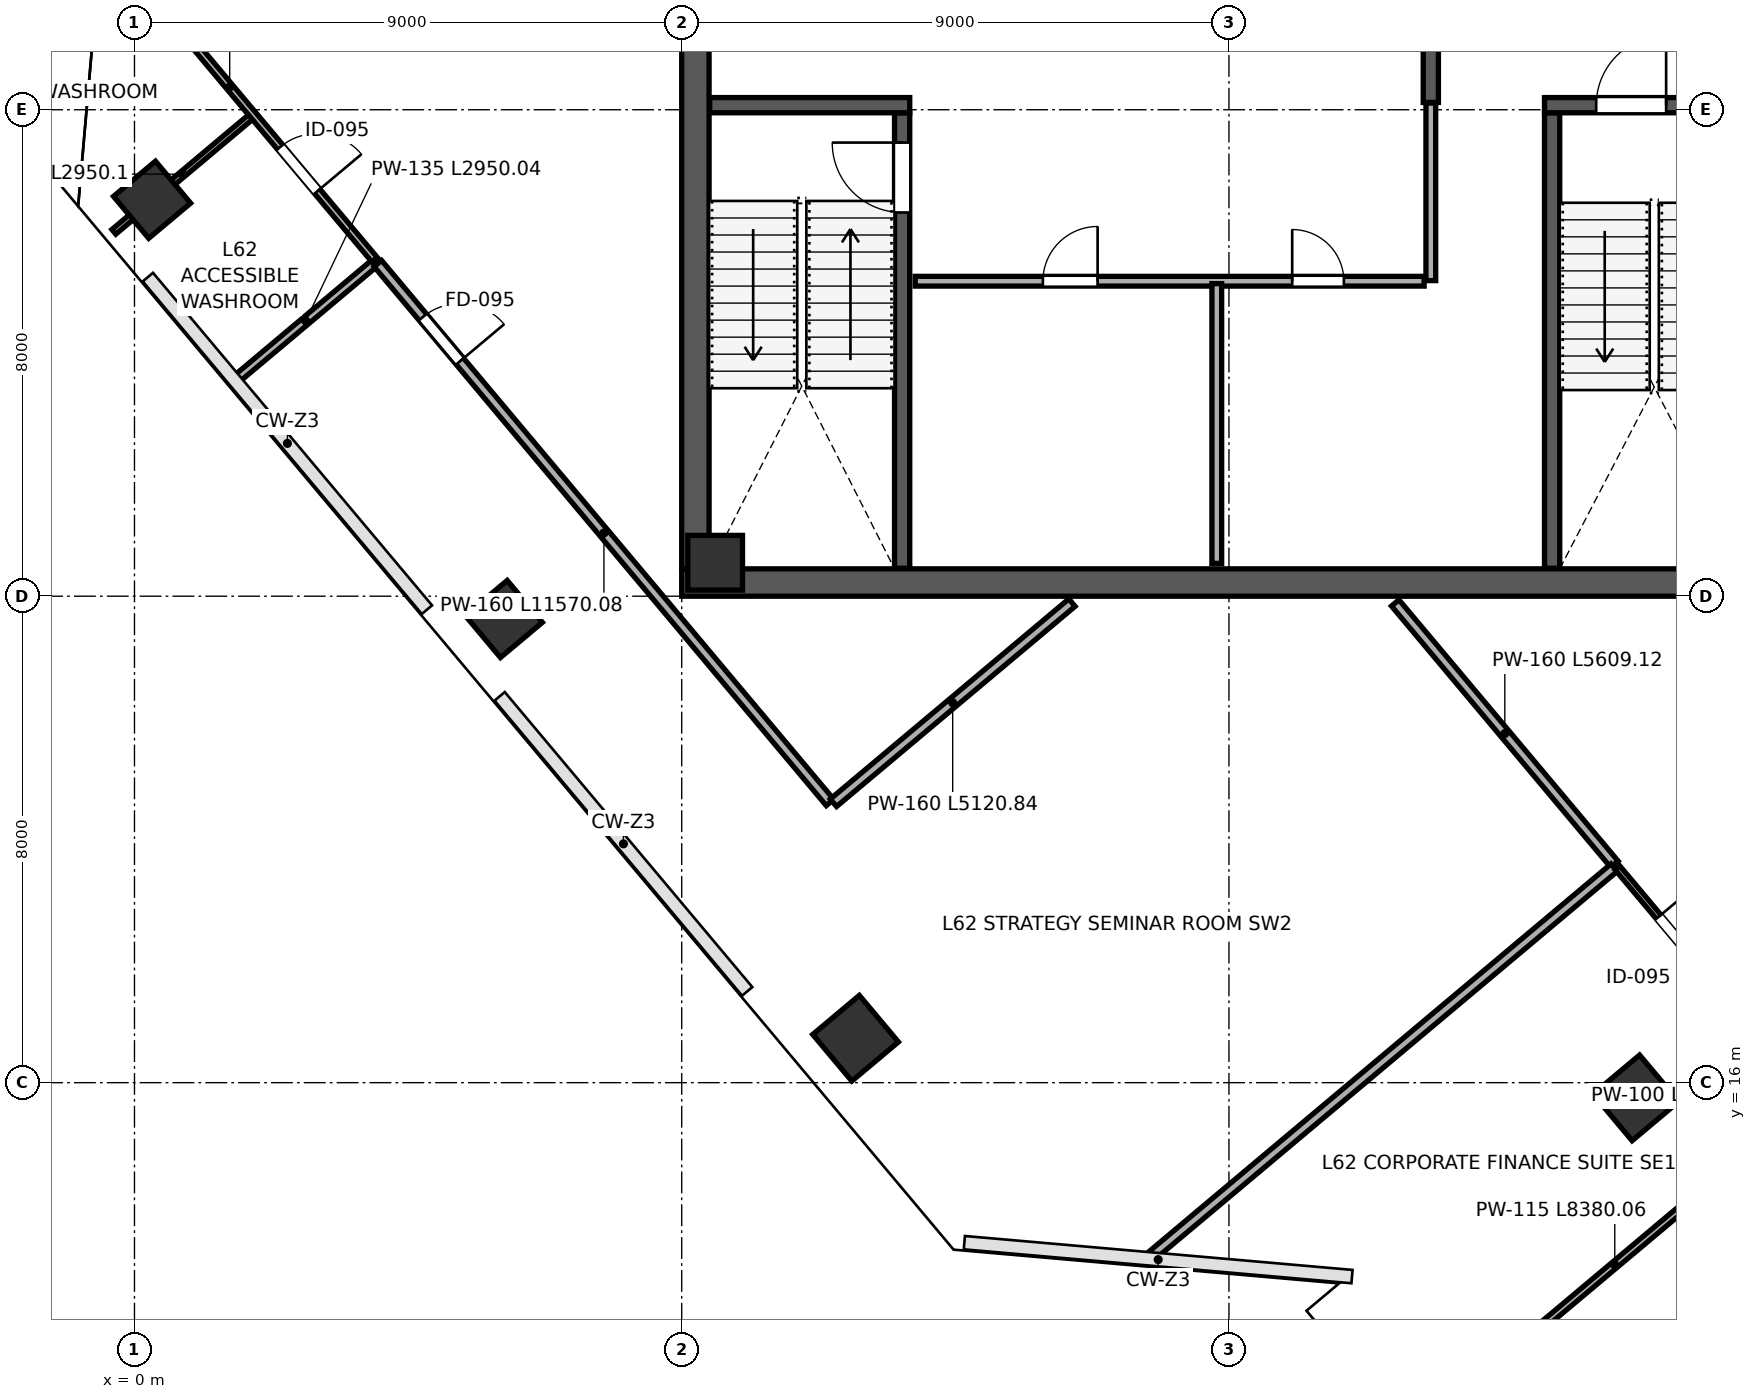
"""IFC4 building model, lengths in metres.
Left out: names, types, materials, properties, quantities, classifications, styles, units other than length and angle.
Written with IfcOpenShell. Run it as: python <this file> out.ifc"""

import sys

from ifc_helpers import new_model, si_unit, direction, frame, frame_2d, origin, origin_2d, place, context, subcontext, project, spatial, rectangle, extrude, clip, halfspace, source, transform, mapped, element, fill, save


model = new_model("IFC4")
c1 = context("Model", 3, precision=1e-05, world=origin(), true_north=direction((0.0, 1.0)))
c2 = subcontext(c1, "Body", "Model", "MODEL_VIEW")
j1 = project(units=[si_unit("LENGTHUNIT", "METRE"), si_unit("PLANEANGLEUNIT", "RADIAN")], contexts=[c1])
p1 = place(None, origin())
s1 = spatial("IfcSite", under=j1, at=p1, CompositionType="ELEMENT")
p2 = place(p1, origin())
s2 = spatial("IfcBuilding", under=s1, at=p2, CompositionType="ELEMENT")
p3 = place(p2, frame((0.0, 0.0, 275.2)))
s3 = spatial("IfcBuildingStorey", under=s2, at=p3, CompositionType="ELEMENT", Elevation=275.2)
m1 = source(origin(), c2, "Body", "SweptSolid", [
    extrude(rectangle(XDim=0.9, YDim=0.9, at=origin_2d()), origin(), (0.0, 0.0, 1.0), 4.198),
])
p4 = place(p3, frame((9.55, 24.55, 0.001), z_axis=(0.0, 0.0, 1.0), x_axis=(1.0, 0.0, 0.0)))
e1 = element("IfcColumn", 1, at=p4, inside=s3, PredefinedType="COLUMN", context=c2, shape_type="MappedRepresentation", body=[
    mapped(m1, transform((0.0, 0.0, 0.0), scale=1.0)),
])
p5 = place(p3, frame((0.289, 30.52, 0.0), z_axis=(-0.010330476679, 0.215464227867, 0.976457089565), x_axis=(0.677872400292, -0.716368043102, 0.165244775241)))
e2 = element("IfcColumn", 2, at=p5, inside=s3, PredefinedType="COLUMN", context=c2, shape_type="Clipping", body=[
    clip(clip(extrude(rectangle(XDim=0.9, YDim=0.9, at=origin_2d()), origin(), (0.0, 0.0, 1.0), 4.301), halfspace(frame((0.0, 0.0, 0.141), z_axis=(0.0, 0.0, -1.0), x_axis=(1.0, 0.0, 0.0)), False)), halfspace(frame((0.0, 0.0, 4.16), z_axis=(0.0, 0.0, 1.0), x_axis=(1.0, 0.0, 0.0)), False)),
])
p6 = place(p3, frame((6.074, 23.625, 0.0), z_axis=(-0.082120416848, 0.159437132432, 0.9837865815), x_axis=(0.916523206917, -0.375646939896, 0.137384816228)))
e3 = element("IfcColumn", 3, at=p6, inside=s3, PredefinedType="COLUMN", context=c2, shape_type="Clipping", body=[
    clip(clip(extrude(rectangle(XDim=0.9, YDim=0.9, at=origin_2d()), origin(), (0.0, 0.0, 1.0), 4.269), halfspace(frame((0.0, 0.0, 0.116), z_axis=(0.0, 0.0, -1.0), x_axis=(1.0, 0.0, 0.0)), False)), halfspace(frame((0.0, 0.0, 4.153), z_axis=(0.0, 0.0, 1.0), x_axis=(1.0, 0.0, 0.0)), False)),
])
p7 = place(p3, frame((11.859, 16.731, 0.0), z_axis=(-0.153742871697, 0.101866793101, 0.982846013303), x_axis=(0.982671946425, 0.119982410812, 0.141280100526)))
e4 = element("IfcColumn", 4, at=p7, inside=s3, PredefinedType="COLUMN", context=c2, shape_type="Clipping", body=[
    clip(clip(extrude(rectangle(XDim=1.0, YDim=1.0, at=origin_2d()), origin(), (0.0, 0.0, 1.0), 4.273), halfspace(frame((0.0, 0.0, 0.133), z_axis=(0.0, 0.0, -1.0), x_axis=(1.0, 0.0, 0.0)), False)), halfspace(frame((0.0, 0.0, 4.14), z_axis=(0.0, 0.0, 1.0), x_axis=(1.0, 0.0, 0.0)), False)),
])
p8 = place(p3, frame((24.692, 15.75, 0.0), z_axis=(-0.167050942703, -0.029044865552, 0.985520359164), x_axis=(0.633685100882, 0.76260882658, 0.129888300253)))
e5 = element("IfcColumn", 5, at=p8, inside=s3, PredefinedType="COLUMN", context=c2, shape_type="Clipping", body=[
    clip(clip(extrude(rectangle(XDim=1.0, YDim=1.0, at=origin_2d()), origin(), (0.0, 0.0, 1.0), 4.262), halfspace(frame((0.0, 0.0, 0.122), z_axis=(0.0, 0.0, -1.0), x_axis=(1.0, 0.0, 0.0)), False)), halfspace(frame((0.0, 0.0, 4.14), z_axis=(0.0, 0.0, 1.0), x_axis=(1.0, 0.0, 0.0)), False)),
])
p9 = place(p3, frame((9.225, 24.45, 0.0), z_axis=(0.0, 0.0, 1.0), x_axis=(0.0, 1.0, 0.0)))
e6 = element("IfcWall", 6, at=p9, inside=s3, PredefinedType="SHEAR", context=c2, shape_type="SweptSolid", body=[
    extrude(rectangle(XDim=15.1, YDim=0.45, at=frame_2d((7.55, 0.0))), origin(), (0.0, 0.0, 1.0), 3.96),
])
p10 = place(p9, frame((8.7, 0.0, 0.0)))
e7 = element("IfcOpeningElement", 7, at=p10, cuts=e6, PredefinedType="OPENING", context=c2, shape_type="SweptSolid", body=[
    extrude(rectangle(XDim=1.15, YDim=2.2, at=frame_2d((0.575, 1.1))), frame((0.0, 0.235, 0.0), z_axis=(0.0, -1.0, 0.0), x_axis=(1.0, 0.0, 0.0)), (0.0, 0.0, 1.0), 0.47),
])
p11 = place(p3, frame((9.0, 24.225, 0.0), z_axis=(0.0, 0.0, 1.0), x_axis=(1.0, 0.0, 0.0)))
e8 = element("IfcWall", 8, at=p11, inside=s3, PredefinedType="SHEAR", context=c2, shape_type="SweptSolid", body=[
    extrude(rectangle(XDim=18.0, YDim=0.45, at=frame_2d((9.0, 0.0))), origin(), (0.0, 0.0, 1.0), 3.96),
])
p12 = place(p3, frame((12.625, 24.46, 0.0), z_axis=(0.0, 0.0, 1.0), x_axis=(0.0, 1.0, 0.0)))
e9 = element("IfcWall", 9, at=p12, inside=s3, PredefinedType="SHEAR", context=c2, shape_type="SweptSolid", body=[
    extrude(rectangle(XDim=7.49, YDim=0.25, at=frame_2d((3.745, 0.0))), origin(), (0.0, 0.0, 1.0), 3.96),
])
p13 = place(p12, frame((5.85, 0.0, 0.0)))
e10 = element("IfcOpeningElement", 10, at=p13, cuts=e9, PredefinedType="OPENING", context=c2, shape_type="SweptSolid", body=[
    extrude(rectangle(XDim=1.15, YDim=2.2, at=frame_2d((0.575, 1.1))), frame((0.0, 0.135, 0.0), z_axis=(0.0, -1.0, 0.0), x_axis=(1.0, 0.0, 0.0)), (0.0, 0.0, 1.0), 0.27),
])
p14 = place(p3, frame((9.46, 32.075, 0.0), z_axis=(0.0, 0.0, 1.0), x_axis=(1.0, 0.0, 0.0)))
e11 = element("IfcWall", 11, at=p14, inside=s3, PredefinedType="SHEAR", context=c2, shape_type="SweptSolid", body=[
    extrude(rectangle(XDim=3.29, YDim=0.25, at=frame_2d((1.645, 0.0))), origin(), (0.0, 0.0, 1.0), 3.96),
])
p15 = place(p3, frame((23.315, 24.46, 0.0), z_axis=(0.0, 0.0, 1.0), x_axis=(0.0, 1.0, 0.0)))
e12 = element("IfcWall", 12, at=p15, inside=s3, PredefinedType="SHEAR", context=c2, shape_type="SweptSolid", body=[
    extrude(rectangle(XDim=7.49, YDim=0.25, at=frame_2d((3.745, 0.0))), origin(), (0.0, 0.0, 1.0), 3.96),
])
p16 = place(p3, frame((23.19, 32.075, 0.0), z_axis=(0.0, 0.0, 1.0), x_axis=(1.0, 0.0, 0.0)))
e13 = element("IfcWall", 13, at=p16, inside=s3, PredefinedType="SHEAR", context=c2, shape_type="SweptSolid", body=[
    extrude(rectangle(XDim=3.35, YDim=0.25, at=frame_2d((1.675, 0.0))), origin(), (0.0, 0.0, 1.0), 3.96),
])
p17 = place(p16, frame((0.85, 0.0, 0.0)))
e14 = element("IfcOpeningElement", 14, at=p17, cuts=e13, PredefinedType="OPENING", context=c2, shape_type="SweptSolid", body=[
    extrude(rectangle(XDim=1.15, YDim=2.2, at=frame_2d((0.575, 1.1))), frame((0.0, 0.135, 0.0), z_axis=(0.0, -1.0, 0.0), x_axis=(1.0, 0.0, 0.0)), (0.0, 0.0, 1.0), 0.27),
])
p18 = place(p3, frame((21.32, 32.12, 0.0), z_axis=(0.0, 0.0, 1.0), x_axis=(0.0, 1.0, 0.0)))
e15 = element("IfcWall", 15, at=p18, inside=s3, PredefinedType="SHEAR", context=c2, shape_type="SweptSolid", body=[
    extrude(rectangle(XDim=7.42, YDim=0.25, at=frame_2d((3.71, 0.0))), origin(), (0.0, 0.0, 1.0), 3.96),
])
p19 = place(p18, frame((1.4, 0.0, 0.0)))
e16 = element("IfcOpeningElement", 16, at=p19, cuts=e15, PredefinedType="OPENING", context=c2, shape_type="SweptSolid", body=[
    extrude(rectangle(XDim=1.15, YDim=2.2, at=frame_2d((0.575, 1.1))), frame((0.0, 0.135, 0.0), z_axis=(0.0, -1.0, 0.0), x_axis=(1.0, 0.0, 0.0)), (0.0, 0.0, 1.0), 0.27),
])
p20 = place(p3, frame((12.84, 29.18, 0.0), z_axis=(0.0, 0.0, 1.0), x_axis=(1.0, 0.0, 0.0)))
e17 = element("IfcWall", 17, at=p20, inside=s3, PredefinedType="PARTITIONING", context=c2, shape_type="SweptSolid", body=[
    extrude(rectangle(XDim=8.37, YDim=0.16, at=frame_2d((4.185, 0.0))), origin(), (0.0, 0.0, 1.0), 3.96),
])
p21 = place(p20, frame((2.1, 0.0, 0.0)))
e18 = element("IfcOpeningElement", 18, at=p21, cuts=e17, PredefinedType="OPENING", context=c2, shape_type="SweptSolid", body=[
    extrude(rectangle(XDim=0.9, YDim=2.15, at=frame_2d((0.45, 1.075))), frame((0.0, 0.09, 0.0), z_axis=(0.0, -1.0, 0.0), x_axis=(1.0, 0.0, 0.0)), (0.0, 0.0, 1.0), 0.18),
])
p22 = place(p20, frame((6.2, 0.0, 0.0)))
e19 = element("IfcOpeningElement", 19, at=p22, cuts=e17, PredefinedType="OPENING", context=c2, shape_type="SweptSolid", body=[
    extrude(rectangle(XDim=0.85, YDim=2.1, at=frame_2d((0.425, 1.05))), frame((0.0, 0.09, 0.0), z_axis=(0.0, -1.0, 0.0), x_axis=(1.0, 0.0, 0.0)), (0.0, 0.0, 1.0), 0.18),
])
p23 = place(p3, frame((17.8, 24.54, 0.0), z_axis=(0.0, 0.0, 1.0), x_axis=(0.0, 1.0, 0.0)))
e20 = element("IfcWall", 20, at=p23, inside=s3, PredefinedType="PARTITIONING", context=c2, shape_type="SweptSolid", body=[
    extrude(rectangle(XDim=4.6, YDim=0.16, at=frame_2d((2.3, 0.0))), origin(), (0.0, 0.0, 1.0), 3.96),
])
p24 = place(p3, frame((21.32, 29.19, 0.0), z_axis=(0.0, 0.0, 1.0), x_axis=(0.0, 1.0, 0.0)))
e21 = element("IfcWall", 21, at=p24, inside=s3, PredefinedType="PARTITIONING", context=c2, shape_type="SweptSolid", body=[
    extrude(rectangle(XDim=2.92, YDim=0.16, at=frame_2d((1.46, 0.0))), origin(), (0.0, 0.0, 1.0), 3.96),
])
p25 = place(p3, frame((-0.339, 29.992, 0.0), z_axis=(0.0, 0.0, 1.0), x_axis=(0.766025914603, 0.642809690465, 0.0)))
e22 = element("IfcWall", 22, at=p25, inside=s3, PredefinedType="PARTITIONING", context=c2, shape_type="SweptSolid", body=[
    extrude(rectangle(XDim=2.95, YDim=0.1, at=frame_2d((1.475, 0.0))), origin(), (0.0, 0.0, 1.0), 3.195),
])
p26 = place(p3, frame((1.686, 27.58, 0.0), z_axis=(0.0, 0.0, 1.0), x_axis=(0.766107411761, 0.642712559116, 0.0)))
e23 = element("IfcWall", 23, at=p26, inside=s3, PredefinedType="PARTITIONING", context=c2, shape_type="SweptSolid", body=[
    extrude(rectangle(XDim=2.95, YDim=0.135, at=frame_2d((1.475, 0.0))), origin(), (0.0, 0.0, 1.0), 3.195),
])
p27 = place(p3, frame((-0.819, 35.216, 0.0), z_axis=(0.0, 0.0, 1.0), x_axis=(0.642772999209, -0.766056702528, 0.0)))
e24 = element("IfcWall", 24, at=p27, inside=s3, PredefinedType="PARTITIONING", context=c2, shape_type="SweptSolid", body=[
    extrude(rectangle(XDim=7.42, YDim=0.115, at=frame_2d((3.71, 0.0))), origin(), (0.0, 0.0, 1.0), 3.96),
])
p28 = place(p27, frame((1.7, 0.0, 0.0)))
e25 = element("IfcOpeningElement", 25, at=p28, cuts=e24, PredefinedType="OPENING", context=c2, shape_type="SweptSolid", body=[
    extrude(rectangle(XDim=0.9, YDim=2.15, at=frame_2d((0.45, 1.075))), frame((0.0, 0.067, 0.0), z_axis=(0.0, -1.0, 0.0), x_axis=(1.0, 0.0, 0.0)), (0.0, 0.0, 1.0), 0.135),
])
p29 = place(p27, frame((5.0, 0.0, 0.0)))
e26 = element("IfcOpeningElement", 26, at=p29, cuts=e24, PredefinedType="OPENING", context=c2, shape_type="SweptSolid", body=[
    extrude(rectangle(XDim=0.95, YDim=2.15, at=frame_2d((0.475, 1.075))), frame((0.0, 0.067, 0.0), z_axis=(0.0, -1.0, 0.0), x_axis=(1.0, 0.0, 0.0)), (0.0, 0.0, 1.0), 0.135),
])
p30 = place(p3, frame((4.002, 29.471, 0.0), z_axis=(0.0, 0.0, 1.0), x_axis=(0.642802048813, -0.766032327021, 0.0)))
e27 = element("IfcWall", 27, at=p30, inside=s3, PredefinedType="PARTITIONING", context=c2, shape_type="SweptSolid", body=[
    extrude(rectangle(XDim=11.57, YDim=0.16, at=frame_2d((5.785, 0.0))), origin(), (0.0, 0.0, 1.0), 3.96),
])
p31 = place(p30, frame((1.15, 0.0, 0.0)))
e28 = element("IfcOpeningElement", 28, at=p31, cuts=e27, PredefinedType="OPENING", context=c2, shape_type="SweptSolid", body=[
    extrude(rectangle(XDim=0.95, YDim=2.15, at=frame_2d((0.475, 1.075))), frame((0.0, 0.09, 0.0), z_axis=(0.0, -1.0, 0.0), x_axis=(1.0, 0.0, 0.0)), (0.0, 0.0, 1.0), 0.18),
])
p32 = place(p3, frame((11.495, 20.603, 0.0), z_axis=(0.0, 0.0, 1.0), x_axis=(0.766059769702, 0.642769343734, 0.0)))
e29 = element("IfcWall", 29, at=p32, inside=s3, PredefinedType="PARTITIONING", context=c2, shape_type="SweptSolid", body=[
    extrude(rectangle(XDim=5.121, YDim=0.16, at=frame_2d((2.561, 0.0))), origin(), (0.0, 0.0, 1.0), 3.96),
])
p33 = place(p3, frame((20.734, 23.889, 0.0), z_axis=(0.0, 0.0, 1.0), x_axis=(0.642758145725, -0.766069165353, 0.0)))
e30 = element("IfcWall", 30, at=p33, inside=s3, PredefinedType="PARTITIONING", context=c2, shape_type="SweptSolid", body=[
    extrude(rectangle(XDim=5.609, YDim=0.16, at=frame_2d((2.804, 0.0))), origin(), (0.0, 0.0, 1.0), 3.96),
])
p34 = place(p3, frame((19.528, 51.245, 0.0), z_axis=(0.0, 0.0, 1.0), x_axis=(0.642782364439, -0.766048844374, 0.0)))
e31 = element("IfcWall", 31, at=p34, inside=s3, PredefinedType="PARTITIONING", context=c2, shape_type="SweptSolid", body=[
    extrude(rectangle(XDim=27.34, YDim=0.1, at=frame_2d((13.67, 0.0))), origin(), (0.0, 0.0, 1.0), 3.96),
])
p35 = place(p34, frame((10.8, 0.0, 0.0)))
e32 = element("IfcOpeningElement", 32, at=p35, cuts=e31, PredefinedType="OPENING", context=c2, shape_type="SweptSolid", body=[
    extrude(rectangle(XDim=0.95, YDim=2.15, at=frame_2d((0.475, 1.075))), frame((0.0, 0.06, 0.0), z_axis=(0.0, -1.0, 0.0), x_axis=(1.0, 0.0, 0.0)), (0.0, 0.0, 1.0), 0.12),
])
p36 = place(p3, frame((16.711, 13.139, 0.0), z_axis=(0.0, 0.0, 1.0), x_axis=(0.766041122188, 0.642791567398, 0.0)))
e33 = element("IfcWall", 33, at=p36, inside=s3, PredefinedType="PARTITIONING", context=c2, shape_type="SweptSolid", body=[
    extrude(rectangle(XDim=9.952, YDim=0.16, at=frame_2d((4.976, 0.0))), origin(), (0.0, 0.0, 1.0), 3.96),
])
p37 = place(p3, frame((24.391, 19.531, 0.0), z_axis=(0.0, 0.0, 1.0), x_axis=(0.642797456481, -0.76603618057, 0.0)))
e34 = element("IfcWall", 34, at=p37, inside=s3, PredefinedType="PARTITIONING", context=c2, shape_type="SweptSolid", body=[
    extrude(rectangle(XDim=9.81, YDim=0.1, at=frame_2d((4.905, 0.0))), origin(), (0.0, 0.0, 1.0), 3.96),
])
p38 = place(p37, frame((1.05, 0.0, 0.0)))
e35 = element("IfcOpeningElement", 35, at=p38, cuts=e34, PredefinedType="OPENING", context=c2, shape_type="SweptSolid", body=[
    extrude(rectangle(XDim=0.95, YDim=2.15, at=frame_2d((0.475, 1.075))), frame((0.0, 0.06, 0.0), z_axis=(0.0, -1.0, 0.0), x_axis=(1.0, 0.0, 0.0)), (0.0, 0.0, 1.0), 0.12),
])
p39 = place(p37, frame((6.46, 0.0, 0.0)))
e36 = element("IfcOpeningElement", 36, at=p39, cuts=e34, PredefinedType="OPENING", context=c2, shape_type="SweptSolid", body=[
    extrude(rectangle(XDim=0.95, YDim=2.15, at=frame_2d((0.475, 1.075))), frame((0.0, 0.06, 0.0), z_axis=(0.0, -1.0, 0.0), x_axis=(1.0, 0.0, 0.0)), (0.0, 0.0, 1.0), 0.12),
])
p40 = place(p3, frame((21.136, 10.312, 0.0), z_axis=(0.0, 0.0, 1.0), x_axis=(0.766048541695, 0.642782725162, 0.0)))
e37 = element("IfcWall", 37, at=p40, inside=s3, PredefinedType="PARTITIONING", context=c2, shape_type="SweptSolid", body=[
    extrude(rectangle(XDim=8.38, YDim=0.115, at=frame_2d((4.19, 0.0))), origin(), (0.0, 0.0, 1.0), 3.96),
])
m2 = source(origin(), c2, "Body", "SweptSolid", [
    extrude(rectangle(XDim=1.15, YDim=2.2, at=frame_2d((0.575, 1.1))), frame((0.0, 0.025, 0.0), z_axis=(0.0, -1.0, 0.0), x_axis=(1.0, 0.0, 0.0)), (0.0, 0.0, 1.0), 0.05),
])
p41 = place(p13, origin())
e38 = element("IfcDoor", 38, at=p41, inside=s3, OperationType="SINGLE_SWING_RIGHT", PredefinedType="DOOR", context=c2, shape_type="MappedRepresentation", body=[
    mapped(m2, transform((0.0, 0.0, 0.0), scale=1.0)),
])
fill(e10, e38)
p42 = place(p17, origin())
e39 = element("IfcDoor", 39, at=p42, inside=s3, OperationType="SINGLE_SWING_RIGHT", PredefinedType="DOOR", context=c2, shape_type="MappedRepresentation", body=[
    mapped(m2, transform((0.0, 0.0, 0.0), scale=1.0)),
])
fill(e14, e39)
m3 = source(origin(), c2, "Body", "SweptSolid", [
    extrude(rectangle(XDim=0.9, YDim=2.15, at=frame_2d((0.45, 1.075))), frame((0.0, 0.025, 0.0), z_axis=(0.0, -1.0, 0.0), x_axis=(1.0, 0.0, 0.0)), (0.0, 0.0, 1.0), 0.05),
])
p43 = place(p21, origin())
e40 = element("IfcDoor", 40, at=p43, inside=s3, OperationType="SINGLE_SWING_RIGHT", PredefinedType="DOOR", context=c2, shape_type="MappedRepresentation", body=[
    mapped(m3, transform((0.0, 0.0, 0.0), scale=1.0)),
])
fill(e18, e40)
m4 = source(origin(), c2, "Body", "SweptSolid", [
    extrude(rectangle(XDim=0.85, YDim=2.1, at=frame_2d((0.425, 1.05))), frame((0.0, 0.025, 0.0), z_axis=(0.0, -1.0, 0.0), x_axis=(1.0, 0.0, 0.0)), (0.0, 0.0, 1.0), 0.05),
])
p44 = place(p22, origin())
e41 = element("IfcDoor", 41, at=p44, inside=s3, OperationType="SINGLE_SWING_LEFT", PredefinedType="DOOR", context=c2, shape_type="MappedRepresentation", body=[
    mapped(m4, transform((0.0, 0.0, 0.0), scale=1.0)),
])
fill(e19, e41)
m5 = source(origin(), c2, "Body", "SweptSolid", [
    extrude(rectangle(XDim=0.95, YDim=2.15, at=frame_2d((0.475, 1.075))), frame((0.0, 0.025, 0.0), z_axis=(0.0, -1.0, 0.0), x_axis=(1.0, 0.0, 0.0)), (0.0, 0.0, 1.0), 0.05),
])
p45 = place(p29, origin())
e42 = element("IfcDoor", 42, at=p45, inside=s3, OperationType="SINGLE_SWING_RIGHT", PredefinedType="DOOR", context=c2, shape_type="MappedRepresentation", body=[
    mapped(m5, transform((0.0, 0.0, 0.0), scale=1.0)),
])
fill(e26, e42)
m6 = source(origin(), c2, "Body", "SweptSolid", [
    extrude(rectangle(XDim=0.95, YDim=2.15, at=frame_2d((0.475, 1.075))), frame((0.0, 0.025, 0.0), z_axis=(0.0, -1.0, 0.0), x_axis=(1.0, 0.0, 0.0)), (0.0, 0.0, 1.0), 0.05),
])
p46 = place(p31, origin())
e43 = element("IfcDoor", 43, at=p46, inside=s3, OperationType="SINGLE_SWING_RIGHT", PredefinedType="DOOR", context=c2, shape_type="MappedRepresentation", body=[
    mapped(m6, transform((0.0, 0.0, 0.0), scale=1.0)),
])
fill(e28, e43)
p47 = place(p38, origin())
e44 = element("IfcDoor", 44, at=p47, inside=s3, OperationType="SINGLE_SWING_LEFT", PredefinedType="DOOR", context=c2, shape_type="MappedRepresentation", body=[
    mapped(m5, transform((0.0, 0.0, 0.0), scale=1.0)),
])
fill(e35, e44)
save(model, sys.argv[1])
